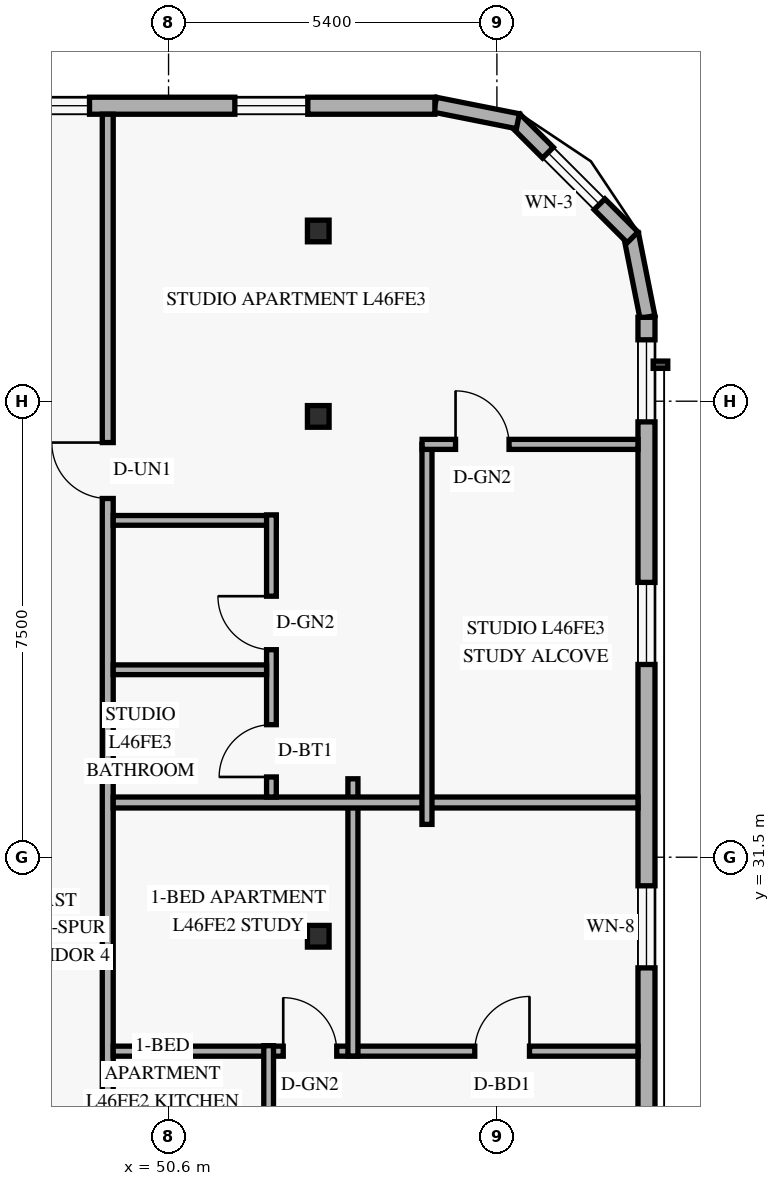
"""IFC4 building model, lengths in metres.
Left out: names, types, materials, properties, quantities, classifications, styles, units other than length and angle.
Written with IfcOpenShell. Run it as: python <this file> out.ifc"""

import sys

from ifc_helpers import new_model, si_unit, direction, frame, frame_2d, origin, origin_2d, place, context, subcontext, project, spatial, rectangle, hollow_rectangle, extrude, element, fill, save


model = new_model("IFC4")
c1 = context("Model", 3, precision=1e-05, world=origin(), true_north=direction((0.0, 1.0)))
c2 = subcontext(c1, "Body", "Model", "MODEL_VIEW")
j1 = project(units=[si_unit("LENGTHUNIT", "METRE"), si_unit("PLANEANGLEUNIT", "RADIAN")], contexts=[c1])
p1 = place(None, origin())
s1 = spatial("IfcSite", under=j1, at=p1, CompositionType="ELEMENT")
p2 = place(p1, origin())
s2 = spatial("IfcBuilding", under=s1, at=p2, CompositionType="ELEMENT")
p3 = place(p2, frame((0.0, 0.0, 177.6)))
s3 = spatial("IfcBuildingStorey", under=s2, at=p3, CompositionType="ELEMENT", Elevation=177.6)
for number, where, z_axis, x_axis in (
    (1, (52.958, 30.2, 0.0), (0.058, 0.0, 0.998), (0.0, 1.0, 0.0)),
    (2, (52.958, 38.75, 0.0), (0.058, 0.0, 0.998), (0.0, 1.0, 0.0)),
    (3, (52.958, 41.8, 0.0), (0.058, 0.0, 0.998), (0.0, 1.0, 0.0)),
):
    element("IfcColumn", number, at=place(p3, frame(where, z_axis=z_axis, x_axis=x_axis)), inside=s3, PredefinedType="COLUMN", context=c2, shape_type="SweptSolid", body=[
        extrude(hollow_rectangle(XDim=0.356, YDim=0.356, WallThickness=0.016, at=origin_2d()), origin(), (0.0, 0.0, 1.0), 3.606),
    ])
p4 = place(p3, frame((58.476, 40.384, 0.0), z_axis=(0.0, 0.0, 1.0), x_axis=(-0.19496651342, 0.980809899341, 0.0)))
e4 = element("IfcWall", 4, at=p4, inside=s3, PredefinedType="SOLIDWALL", context=c2, shape_type="SweptSolid", body=[
    extrude(rectangle(XDim=1.389, YDim=0.25, at=frame_2d((0.694, 0.0))), origin(), (0.0, 0.0, 1.0), 3.36),
])
p5 = place(p3, frame((58.232, 41.695, 0.0), z_axis=(0.0, 0.0, 1.0), x_axis=(-0.707106781187, 0.707106781187, 0.0)))
e5 = element("IfcWall", 5, at=p5, inside=s3, PredefinedType="SOLIDWALL", context=c2, shape_type="SweptSolid", body=[
    extrude(rectangle(XDim=2.739, YDim=0.25, at=frame_2d((1.37, 0.0))), origin(), (0.0, 0.0, 1.0), 3.36),
])
p6 = place(p5, frame((0.77, 0.0, 0.85)))
e6 = element("IfcOpeningElement", 6, at=p6, cuts=e5, PredefinedType="OPENING", context=c2, shape_type="SweptSolid", body=[
    extrude(rectangle(XDim=1.2, YDim=1.5, at=frame_2d((0.6, 0.75))), frame((0.0, 0.135, 0.0), z_axis=(0.0, -1.0, 0.0), x_axis=(1.0, 0.0, 0.0)), (0.0, 0.0, 1.0), 0.27),
])
p7 = place(p3, frame((56.345, 43.605, 0.0), z_axis=(0.0, 0.0, 1.0), x_axis=(-0.980809899341, 0.19496651342, 0.0)))
e7 = element("IfcWall", 7, at=p7, inside=s3, PredefinedType="SOLIDWALL", context=c2, shape_type="SweptSolid", body=[
    extrude(rectangle(XDim=1.389, YDim=0.25, at=frame_2d((0.694, 0.0))), origin(), (0.0, 0.0, 1.0), 3.36),
])
p8 = place(p3, frame((58.46, 7.62, 0.0), z_axis=(0.0, 0.0, 1.0), x_axis=(0.0, 1.0, 0.0)))
e8 = element("IfcWall", 8, at=p8, inside=s3, PredefinedType="SOLIDWALL", context=c2, shape_type="SweptSolid", body=[
    extrude(rectangle(XDim=32.76, YDim=0.28, at=frame_2d((16.38, 0.0))), origin(), (0.0, 0.0, 1.0), 3.36),
])
p9 = place(p8, frame((4.715, 0.0, 0.85)))
e9 = element("IfcOpeningElement", 9, at=p9, cuts=e8, PredefinedType="OPENING", context=c2, shape_type="SweptSolid", body=[
    extrude(rectangle(XDim=1.35, YDim=1.55, at=frame_2d((0.675, 0.775))), frame((0.0, 0.15, 0.0), z_axis=(0.0, -1.0, 0.0), x_axis=(1.0, 0.0, 0.0)), (0.0, 0.0, 1.0), 0.3),
])
p10 = place(p8, frame((11.35, 0.0, 0.85)))
e10 = element("IfcOpeningElement", 10, at=p10, cuts=e8, PredefinedType="OPENING", context=c2, shape_type="SweptSolid", body=[
    extrude(rectangle(XDim=1.35, YDim=1.55, at=frame_2d((0.675, 0.775))), frame((0.0, 0.15, 0.0), z_axis=(0.0, -1.0, 0.0), x_axis=(1.0, 0.0, 0.0)), (0.0, 0.0, 1.0), 0.3),
])
p11 = place(p8, frame((16.305, 0.0, 0.85)))
e11 = element("IfcOpeningElement", 11, at=p11, cuts=e8, PredefinedType="OPENING", context=c2, shape_type="SweptSolid", body=[
    extrude(rectangle(XDim=1.35, YDim=1.55, at=frame_2d((0.675, 0.775))), frame((0.0, 0.15, 0.0), z_axis=(0.0, -1.0, 0.0), x_axis=(1.0, 0.0, 0.0)), (0.0, 0.0, 1.0), 0.3),
])
p12 = place(p8, frame((22.06, 0.0, 0.85)))
e12 = element("IfcOpeningElement", 12, at=p12, cuts=e8, PredefinedType="OPENING", context=c2, shape_type="SweptSolid", body=[
    extrude(rectangle(XDim=1.35, YDim=1.55, at=frame_2d((0.675, 0.775))), frame((0.0, 0.15, 0.0), z_axis=(0.0, -1.0, 0.0), x_axis=(1.0, 0.0, 0.0)), (0.0, 0.0, 1.0), 0.3),
])
p13 = place(p8, frame((27.05, 0.0, 0.85)))
e13 = element("IfcOpeningElement", 13, at=p13, cuts=e8, PredefinedType="OPENING", context=c2, shape_type="SweptSolid", body=[
    extrude(rectangle(XDim=1.35, YDim=1.55, at=frame_2d((0.675, 0.775))), frame((0.0, 0.15, 0.0), z_axis=(0.0, -1.0, 0.0), x_axis=(1.0, 0.0, 0.0)), (0.0, 0.0, 1.0), 0.3),
])
p14 = place(p8, frame((31.04, 0.0, 0.85)))
e14 = element("IfcOpeningElement", 14, at=p14, cuts=e8, PredefinedType="OPENING", context=c2, shape_type="SweptSolid", body=[
    extrude(rectangle(XDim=1.35, YDim=1.55, at=frame_2d((0.675, 0.775))), frame((0.0, 0.15, 0.0), z_axis=(0.0, -1.0, 0.0), x_axis=(1.0, 0.0, 0.0)), (0.0, 0.0, 1.0), 0.3),
])
p15 = place(p3, frame((54.98, 43.86, 0.0), z_axis=(0.0, 0.0, 1.0), x_axis=(-1.0, 0.0, 0.0)))
e15 = element("IfcWall", 15, at=p15, inside=s3, PredefinedType="SOLIDWALL", context=c2, shape_type="SweptSolid", body=[
    extrude(rectangle(XDim=33.76, YDim=0.28, at=frame_2d((16.88, 0.0))), origin(), (0.0, 0.0, 1.0), 3.36),
])
p16 = place(p15, frame((28.355, 0.0, 0.85)))
e16 = element("IfcOpeningElement", 16, at=p16, cuts=e15, PredefinedType="OPENING", context=c2, shape_type="SweptSolid", body=[
    extrude(rectangle(XDim=1.2, YDim=1.5, at=frame_2d((0.6, 0.75))), frame((0.0, 0.15, 0.0), z_axis=(0.0, -1.0, 0.0), x_axis=(1.0, 0.0, 0.0)), (0.0, 0.0, 1.0), 0.3),
])
p17 = place(p15, frame((21.47, 0.0, 0.85)))
e17 = element("IfcOpeningElement", 17, at=p17, cuts=e15, PredefinedType="OPENING", context=c2, shape_type="SweptSolid", body=[
    extrude(rectangle(XDim=1.2, YDim=1.5, at=frame_2d((0.6, 0.75))), frame((0.0, 0.15, 0.0), z_axis=(0.0, -1.0, 0.0), x_axis=(1.0, 0.0, 0.0)), (0.0, 0.0, 1.0), 0.3),
])
p18 = place(p15, frame((17.74, 0.0, 0.85)))
e18 = element("IfcOpeningElement", 18, at=p18, cuts=e15, PredefinedType="OPENING", context=c2, shape_type="SweptSolid", body=[
    extrude(rectangle(XDim=1.2, YDim=1.5, at=frame_2d((0.6, 0.75))), frame((0.0, 0.15, 0.0), z_axis=(0.0, -1.0, 0.0), x_axis=(1.0, 0.0, 0.0)), (0.0, 0.0, 1.0), 0.3),
])
p19 = place(p15, frame((13.62, 0.0, 0.85)))
e19 = element("IfcOpeningElement", 19, at=p19, cuts=e15, PredefinedType="OPENING", context=c2, shape_type="SweptSolid", body=[
    extrude(rectangle(XDim=1.2, YDim=1.5, at=frame_2d((0.6, 0.75))), frame((0.0, 0.15, 0.0), z_axis=(0.0, -1.0, 0.0), x_axis=(1.0, 0.0, 0.0)), (0.0, 0.0, 1.0), 0.3),
])
p20 = place(p15, frame((8.65, 0.0, 0.85)))
e20 = element("IfcOpeningElement", 20, at=p20, cuts=e15, PredefinedType="OPENING", context=c2, shape_type="SweptSolid", body=[
    extrude(rectangle(XDim=1.2, YDim=1.5, at=frame_2d((0.6, 0.75))), frame((0.0, 0.15, 0.0), z_axis=(0.0, -1.0, 0.0), x_axis=(1.0, 0.0, 0.0)), (0.0, 0.0, 1.0), 0.3),
])
p21 = place(p15, frame((5.68, 0.0, 0.85)))
e21 = element("IfcOpeningElement", 21, at=p21, cuts=e15, PredefinedType="OPENING", context=c2, shape_type="SweptSolid", body=[
    extrude(rectangle(XDim=1.2, YDim=1.5, at=frame_2d((0.6, 0.75))), frame((0.0, 0.15, 0.0), z_axis=(0.0, -1.0, 0.0), x_axis=(1.0, 0.0, 0.0)), (0.0, 0.0, 1.0), 0.3),
])
p22 = place(p15, frame((2.09, 0.0, 0.85)))
e22 = element("IfcOpeningElement", 22, at=p22, cuts=e15, PredefinedType="OPENING", context=c2, shape_type="SweptSolid", body=[
    extrude(rectangle(XDim=1.2, YDim=1.5, at=frame_2d((0.6, 0.75))), frame((0.0, 0.15, 0.0), z_axis=(0.0, -1.0, 0.0), x_axis=(1.0, 0.0, 0.0)), (0.0, 0.0, 1.0), 0.3),
])
p23 = place(p3, frame((49.6, 4.28, 0.0), z_axis=(0.0, 0.0, 1.0), x_axis=(0.0, 1.0, 0.0)))
e23 = element("IfcWall", 23, at=p23, inside=s3, PredefinedType="STANDARD", context=c2, shape_type="SweptSolid", body=[
    extrude(rectangle(XDim=39.44, YDim=0.18, at=frame_2d((19.72, 0.0))), origin(), (0.0, 0.0, 1.0), 2.73),
])
p24 = place(p23, frame((8.52, 0.0, 0.0)))
e24 = element("IfcOpeningElement", 24, at=p24, cuts=e23, PredefinedType="OPENING", context=c2, shape_type="SweptSolid", body=[
    extrude(rectangle(XDim=0.92, YDim=2.15, at=frame_2d((0.46, 1.075))), frame((0.0, 0.1, 0.0), z_axis=(0.0, -1.0, 0.0), x_axis=(1.0, 0.0, 0.0)), (0.0, 0.0, 1.0), 0.2),
])
p25 = place(p23, frame((18.052, 0.0, 0.0)))
e25 = element("IfcOpeningElement", 25, at=p25, cuts=e23, PredefinedType="OPENING", context=c2, shape_type="SweptSolid", body=[
    extrude(rectangle(XDim=0.92, YDim=2.15, at=frame_2d((0.46, 1.075))), frame((0.0, 0.1, 0.0), z_axis=(0.0, -1.0, 0.0), x_axis=(1.0, 0.0, 0.0)), (0.0, 0.0, 1.0), 0.2),
])
p26 = place(p23, frame((33.12, 0.0, 0.0)))
e26 = element("IfcOpeningElement", 26, at=p26, cuts=e23, PredefinedType="OPENING", context=c2, shape_type="SweptSolid", body=[
    extrude(rectangle(XDim=0.92, YDim=2.15, at=frame_2d((0.46, 1.075))), frame((0.0, 0.1, 0.0), z_axis=(0.0, -1.0, 0.0), x_axis=(1.0, 0.0, 0.0)), (0.0, 0.0, 1.0), 0.2),
])
p27 = place(p3, frame((49.69, 28.31, 0.0), z_axis=(0.0, 0.0, 1.0), x_axis=(1.0, 0.0, 0.0)))
e27 = element("IfcWall", 27, at=p27, inside=s3, PredefinedType="PARTITIONING", context=c2, shape_type="SweptSolid", body=[
    extrude(rectangle(XDim=8.63, YDim=0.165, at=frame_2d((4.315, 0.0))), origin(), (0.0, 0.0, 1.0), 2.879),
])
p28 = place(p27, frame((2.796, 0.0, 0.0)))
e28 = element("IfcOpeningElement", 28, at=p28, cuts=e27, PredefinedType="OPENING", context=c2, shape_type="SweptSolid", body=[
    extrude(rectangle(XDim=0.88, YDim=2.12, at=frame_2d((0.44, 1.06))), frame((0.0, 0.093, 0.0), z_axis=(0.0, -1.0, 0.0), x_axis=(1.0, 0.0, 0.0)), (0.0, 0.0, 1.0), 0.185),
])
p29 = place(p27, frame((5.946, 0.0, 0.0)))
e29 = element("IfcOpeningElement", 29, at=p29, cuts=e27, PredefinedType="OPENING", context=c2, shape_type="SweptSolid", body=[
    extrude(rectangle(XDim=0.9, YDim=2.14, at=frame_2d((0.45, 1.07))), frame((0.0, 0.093, 0.0), z_axis=(0.0, -1.0, 0.0), x_axis=(1.0, 0.0, 0.0)), (0.0, 0.0, 1.0), 0.185),
])
p30 = place(p3, frame((52.246, 23.542, 0.0), z_axis=(0.0, 0.0, 1.0), x_axis=(0.0, 1.0, 0.0)))
e30 = element("IfcWall", 30, at=p30, inside=s3, PredefinedType="PLUMBINGWALL", context=c2, shape_type="SweptSolid", body=[
    extrude(rectangle(XDim=4.858, YDim=0.16, at=frame_2d((2.429, 0.0))), origin(), (0.0, 0.0, 1.0), 3.36),
])
p31 = place(p30, frame((0.42, 0.0, 0.0)))
e31 = element("IfcOpeningElement", 31, at=p31, cuts=e30, PredefinedType="OPENING", context=c2, shape_type="SweptSolid", body=[
    extrude(rectangle(XDim=0.86, YDim=2.12, at=frame_2d((0.43, 1.06))), frame((0.0, 0.09, 0.0), z_axis=(0.0, -1.0, 0.0), x_axis=(1.0, 0.0, 0.0)), (0.0, 0.0, 1.0), 0.18),
])
p32 = place(p30, frame((2.572, 0.0, 0.0)))
e32 = element("IfcOpeningElement", 32, at=p32, cuts=e30, PredefinedType="OPENING", context=c2, shape_type="SweptSolid", body=[
    extrude(rectangle(XDim=0.88, YDim=2.12, at=frame_2d((0.44, 1.06))), frame((0.0, 0.09, 0.0), z_axis=(0.0, -1.0, 0.0), x_axis=(1.0, 0.0, 0.0)), (0.0, 0.0, 1.0), 0.18),
])
p33 = place(p3, frame((53.632, 28.23, 0.0), z_axis=(0.0, 0.0, 1.0), x_axis=(0.0, 1.0, 0.0)))
e33 = element("IfcWall", 33, at=p33, inside=s3, PredefinedType="PARTITIONING", context=c2, shape_type="SweptSolid", body=[
    extrude(rectangle(XDim=4.56, YDim=0.165, at=frame_2d((2.28, 0.0))), origin(), (0.0, 0.0, 1.0), 3.36),
])
p34 = place(p3, frame((49.69, 32.4, 0.0), z_axis=(0.0, 0.0, 1.0), x_axis=(1.0, 0.0, 0.0)))
e34 = element("IfcWall", 34, at=p34, inside=s3, PredefinedType="PARTITIONING", context=c2, shape_type="SweptSolid", body=[
    extrude(rectangle(XDim=8.63, YDim=0.18, at=frame_2d((4.315, 0.0))), origin(), (0.0, 0.0, 1.0), 2.879),
])
p35 = place(p3, frame((49.69, 37.04, 0.0), z_axis=(0.0, 0.0, 1.0), x_axis=(1.0, 0.0, 0.0)))
e35 = element("IfcWall", 35, at=p35, inside=s3, PredefinedType="PLUMBINGWALL", context=c2, shape_type="SweptSolid", body=[
    extrude(rectangle(XDim=2.682, YDim=0.16, at=frame_2d((1.341, 0.0))), origin(), (0.0, 0.0, 1.0), 3.36),
])
p36 = place(p3, frame((52.292, 32.49, 0.0), z_axis=(0.0, 0.0, 1.0), x_axis=(0.0, 1.0, 0.0)))
e36 = element("IfcWall", 36, at=p36, inside=s3, PredefinedType="PLUMBINGWALL", context=c2, shape_type="SweptSolid", body=[
    extrude(rectangle(XDim=4.64, YDim=0.16, at=frame_2d((2.32, 0.0))), origin(), (0.0, 0.0, 1.0), 2.984),
])
p37 = place(p36, frame((0.33, 0.0, 0.0)))
e37 = element("IfcOpeningElement", 37, at=p37, cuts=e36, PredefinedType="OPENING", context=c2, shape_type="SweptSolid", body=[
    extrude(rectangle(XDim=0.86, YDim=2.12, at=frame_2d((0.43, 1.06))), frame((0.0, 0.09, 0.0), z_axis=(0.0, -1.0, 0.0), x_axis=(1.0, 0.0, 0.0)), (0.0, 0.0, 1.0), 0.18),
])
p38 = place(p36, frame((2.423, 0.0, 0.0)))
e38 = element("IfcOpeningElement", 38, at=p38, cuts=e36, PredefinedType="OPENING", context=c2, shape_type="SweptSolid", body=[
    extrude(rectangle(XDim=0.88, YDim=2.12, at=frame_2d((0.44, 1.06))), frame((0.0, 0.09, 0.0), z_axis=(0.0, -1.0, 0.0), x_axis=(1.0, 0.0, 0.0)), (0.0, 0.0, 1.0), 0.18),
])
p39 = place(p3, frame((49.69, 34.583, 0.0), z_axis=(0.0, 0.0, 1.0), x_axis=(1.0, 0.0, 0.0)))
e39 = element("IfcWall", 39, at=p39, inside=s3, PredefinedType="PLUMBINGWALL", context=c2, shape_type="SweptSolid", body=[
    extrude(rectangle(XDim=2.522, YDim=0.16, at=frame_2d((1.261, 0.0))), origin(), (0.0, 0.0, 1.0), 2.984),
])
p40 = place(p3, frame((54.85, 32.04, 0.0), z_axis=(0.0, 0.0, 1.0), x_axis=(0.0, 1.0, 0.0)))
e40 = element("IfcWall", 40, at=p40, inside=s3, PredefinedType="PARTITIONING", context=c2, shape_type="SweptSolid", body=[
    extrude(rectangle(XDim=6.25, YDim=0.165, at=frame_2d((3.125, 0.0))), origin(), (0.0, 0.0, 1.0), 3.36),
])
p41 = place(p3, frame((54.77, 38.29, 0.0), z_axis=(0.0, 0.0, 1.0), x_axis=(1.0, 0.0, 0.0)))
e41 = element("IfcWall", 41, at=p41, inside=s3, PredefinedType="PARTITIONING", context=c2, shape_type="SweptSolid", body=[
    extrude(rectangle(XDim=3.55, YDim=0.165, at=frame_2d((1.775, 0.0))), origin(), (0.0, 0.0, 1.0), 3.36),
])
p42 = place(p41, frame((0.55, 0.0, 0.0)))
e42 = element("IfcOpeningElement", 42, at=p42, cuts=e41, PredefinedType="OPENING", context=c2, shape_type="SweptSolid", body=[
    extrude(rectangle(XDim=0.88, YDim=2.12, at=frame_2d((0.44, 1.06))), frame((0.0, 0.093, 0.0), z_axis=(0.0, -1.0, 0.0), x_axis=(1.0, 0.0, 0.0)), (0.0, 0.0, 1.0), 0.185),
])
p43 = place(p6, origin())
e43 = element("IfcWindow", 43, at=p43, inside=s3, PartitioningType="SINGLE_PANEL", PredefinedType="WINDOW", context=c2, shape_type="SweptSolid", body=[
    extrude(rectangle(XDim=1.2, YDim=1.5, at=frame_2d((0.6, 0.75))), frame((0.0, 0.03, 0.0), z_axis=(0.0, -1.0, 0.0), x_axis=(1.0, 0.0, 0.0)), (0.0, 0.0, 1.0), 0.06),
])
fill(e6, e43)
p44 = place(p12, origin())
e44 = element("IfcWindow", 44, at=p44, inside=s3, PartitioningType="SINGLE_PANEL", PredefinedType="WINDOW", context=c2, shape_type="SweptSolid", body=[
    extrude(rectangle(XDim=1.35, YDim=1.55, at=frame_2d((0.675, 0.775))), frame((0.0, 0.03, 0.0), z_axis=(0.0, -1.0, 0.0), x_axis=(1.0, 0.0, 0.0)), (0.0, 0.0, 1.0), 0.06),
])
fill(e12, e44)
p45 = place(p13, origin())
e45 = element("IfcWindow", 45, at=p45, inside=s3, PartitioningType="SINGLE_PANEL", PredefinedType="WINDOW", context=c2, shape_type="SweptSolid", body=[
    extrude(rectangle(XDim=1.35, YDim=1.55, at=frame_2d((0.675, 0.775))), frame((0.0, 0.03, 0.0), z_axis=(0.0, -1.0, 0.0), x_axis=(1.0, 0.0, 0.0)), (0.0, 0.0, 1.0), 0.06),
])
fill(e13, e45)
p46 = place(p14, origin())
e46 = element("IfcWindow", 46, at=p46, inside=s3, PartitioningType="SINGLE_PANEL", PredefinedType="WINDOW", context=c2, shape_type="SweptSolid", body=[
    extrude(rectangle(XDim=1.35, YDim=1.55, at=frame_2d((0.675, 0.775))), frame((0.0, 0.03, 0.0), z_axis=(0.0, -1.0, 0.0), x_axis=(1.0, 0.0, 0.0)), (0.0, 0.0, 1.0), 0.06),
])
fill(e14, e46)
p47 = place(p21, origin())
e47 = element("IfcWindow", 47, at=p47, inside=s3, PartitioningType="SINGLE_PANEL", PredefinedType="WINDOW", context=c2, shape_type="SweptSolid", body=[
    extrude(rectangle(XDim=1.2, YDim=1.5, at=frame_2d((0.6, 0.75))), frame((0.0, 0.03, 0.0), z_axis=(0.0, -1.0, 0.0), x_axis=(1.0, 0.0, 0.0)), (0.0, 0.0, 1.0), 0.06),
])
fill(e21, e47)
p48 = place(p22, origin())
e48 = element("IfcWindow", 48, at=p48, inside=s3, PartitioningType="SINGLE_PANEL", PredefinedType="WINDOW", context=c2, shape_type="SweptSolid", body=[
    extrude(rectangle(XDim=1.2, YDim=1.5, at=frame_2d((0.6, 0.75))), frame((0.0, 0.03, 0.0), z_axis=(0.0, -1.0, 0.0), x_axis=(1.0, 0.0, 0.0)), (0.0, 0.0, 1.0), 0.06),
])
fill(e22, e48)
p49 = place(p28, origin())
e49 = element("IfcDoor", 49, at=p49, inside=s3, OperationType="SINGLE_SWING_LEFT", PredefinedType="DOOR", context=c2, shape_type="SweptSolid", body=[
    extrude(rectangle(XDim=0.88, YDim=2.12, at=frame_2d((0.44, 1.06))), frame((0.0, 0.025, 0.0), z_axis=(0.0, -1.0, 0.0), x_axis=(1.0, 0.0, 0.0)), (0.0, 0.0, 1.0), 0.05),
])
fill(e28, e49)
p50 = place(p29, origin())
e50 = element("IfcDoor", 50, at=p50, inside=s3, OperationType="SINGLE_SWING_RIGHT", PredefinedType="DOOR", context=c2, shape_type="SweptSolid", body=[
    extrude(rectangle(XDim=0.9, YDim=2.14, at=frame_2d((0.45, 1.07))), frame((0.0, 0.025, 0.0), z_axis=(0.0, -1.0, 0.0), x_axis=(1.0, 0.0, 0.0)), (0.0, 0.0, 1.0), 0.05),
])
fill(e29, e50)
p51 = place(p42, origin())
e51 = element("IfcDoor", 51, at=p51, inside=s3, OperationType="SINGLE_SWING_LEFT", PredefinedType="DOOR", context=c2, shape_type="SweptSolid", body=[
    extrude(rectangle(XDim=0.88, YDim=2.12, at=frame_2d((0.44, 1.06))), frame((0.0, 0.025, 0.0), z_axis=(0.0, -1.0, 0.0), x_axis=(1.0, 0.0, 0.0)), (0.0, 0.0, 1.0), 0.05),
])
fill(e42, e51)
p52 = place(p26, origin())
e52 = element("IfcDoor", 52, at=p52, inside=s3, OperationType="SINGLE_SWING_RIGHT", PredefinedType="DOOR", context=c2, shape_type="SweptSolid", body=[
    extrude(rectangle(XDim=0.92, YDim=2.15, at=frame_2d((0.46, 1.075))), frame((0.0, 0.025, 0.0), z_axis=(0.0, -1.0, 0.0), x_axis=(1.0, 0.0, 0.0)), (0.0, 0.0, 1.0), 0.05),
])
fill(e26, e52)
p53 = place(p37, origin())
e53 = element("IfcDoor", 53, at=p53, inside=s3, OperationType="SINGLE_SWING_LEFT", PredefinedType="DOOR", context=c2, shape_type="SweptSolid", body=[
    extrude(rectangle(XDim=0.86, YDim=2.12, at=frame_2d((0.43, 1.06))), frame((0.0, 0.025, 0.0), z_axis=(0.0, -1.0, 0.0), x_axis=(1.0, 0.0, 0.0)), (0.0, 0.0, 1.0), 0.05),
])
fill(e37, e53)
p54 = place(p38, origin())
e54 = element("IfcDoor", 54, at=p54, inside=s3, OperationType="SINGLE_SWING_RIGHT", PredefinedType="DOOR", context=c2, shape_type="SweptSolid", body=[
    extrude(rectangle(XDim=0.88, YDim=2.12, at=frame_2d((0.44, 1.06))), frame((0.0, 0.025, 0.0), z_axis=(0.0, -1.0, 0.0), x_axis=(1.0, 0.0, 0.0)), (0.0, 0.0, 1.0), 0.05),
])
fill(e38, e54)
save(model, sys.argv[1])
